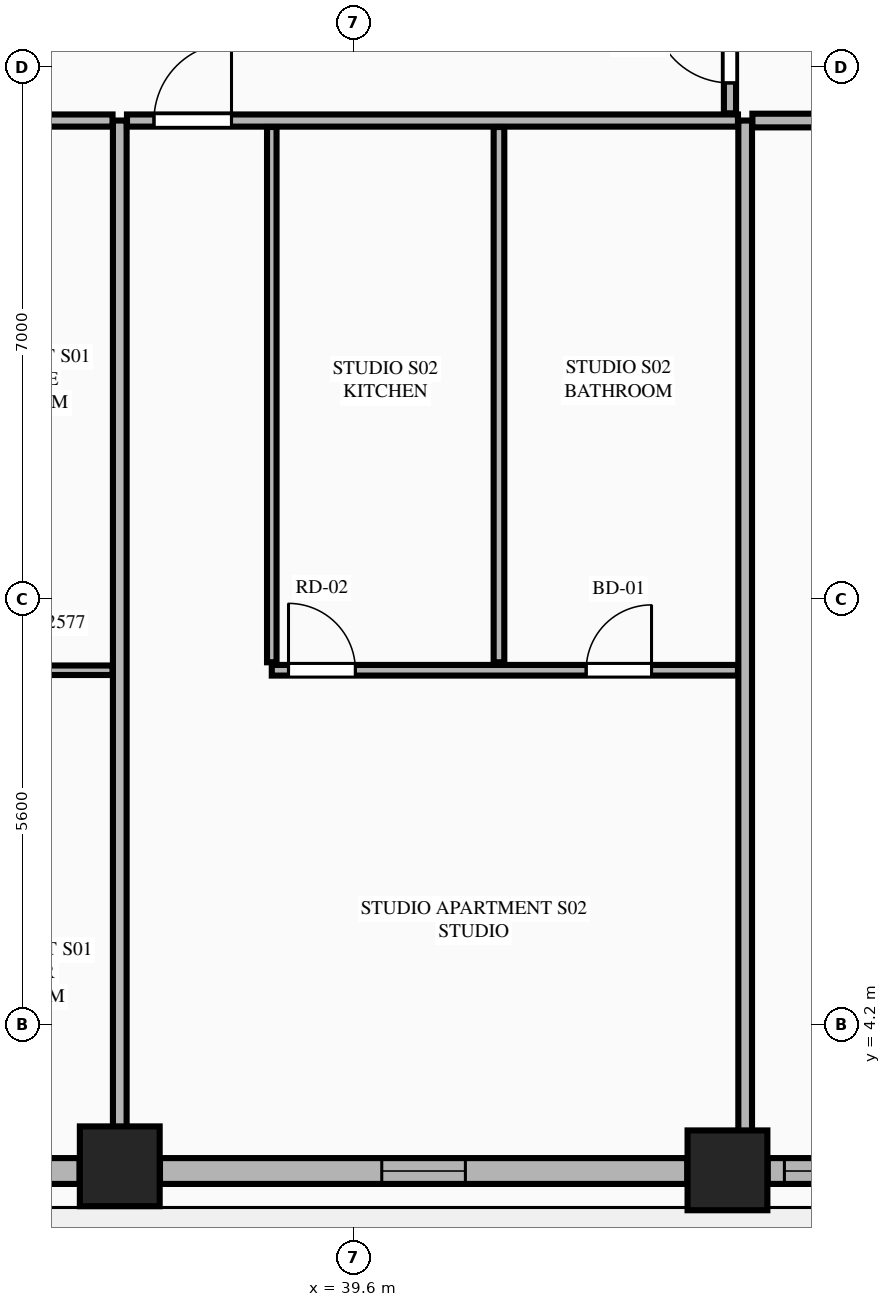
"""IFC4 building model, lengths in metres.
Left out: names, types, materials, properties, quantities, classifications, styles, units other than length and angle.
Written with IfcOpenShell. Run it as: python <this file> out.ifc"""

import sys

from ifc_helpers import new_model, si_unit, direction, frame, frame_2d, origin, origin_2d, place, context, subcontext, project, spatial, rectangle, extrude, element, fill, save


model = new_model("IFC4")
c1 = context("Model", 3, precision=1e-05, world=origin(), true_north=direction((0.0, 1.0)))
c2 = subcontext(c1, "Body", "Model", "MODEL_VIEW")
j1 = project(units=[si_unit("LENGTHUNIT", "METRE"), si_unit("PLANEANGLEUNIT", "RADIAN")], contexts=[c1])
p1 = place(None, origin())
s1 = spatial("IfcSite", under=j1, at=p1, CompositionType="ELEMENT")
p2 = place(p1, origin())
s2 = spatial("IfcBuilding", under=s1, at=p2, CompositionType="ELEMENT")
p3 = place(p2, frame((0.0, 0.0, 90.65)))
s3 = spatial("IfcBuildingStorey", under=s2, at=p3, CompositionType="ELEMENT", Elevation=90.65)
for number, where, z_axis, x_axis in (
    (1, (36.522, 2.342, 0.0), (0.0, 0.0, 1.0), (1.0, 0.0, 0.0)),
    (2, (44.517, 2.289, 0.0), (0.0, 0.0, 1.0), (1.0, 0.0, 0.0)),
):
    element("IfcColumn", number, at=place(p3, frame(where, z_axis=z_axis, x_axis=x_axis)), inside=s3, PredefinedType="COLUMN", context=c2, shape_type="SweptSolid", body=[
        extrude(rectangle(XDim=1.05, YDim=1.05, at=origin_2d()), origin(), (0.0, 0.0, 1.0), 3.55),
    ])
p4 = place(p3, frame((28.807, 2.28, 0.0), z_axis=(0.0, 0.0, 1.0), x_axis=(1.0, 0.0, 0.0)))
e3 = element("IfcWall", 3, at=p4, inside=s3, PredefinedType="STANDARD", context=c2, shape_type="SweptSolid", body=[
    extrude(rectangle(XDim=7.186, YDim=0.34, at=frame_2d((3.593, 0.0))), origin(), (0.0, 0.0, 1.0), 2.712),
])
p5 = place(p4, frame((1.92, 0.0, 0.0)))
e4 = element("IfcOpeningElement", 4, at=p5, cuts=e3, PredefinedType="OPENING", context=c2, shape_type="SweptSolid", body=[
    extrude(rectangle(XDim=1.1, YDim=2.25, at=frame_2d((0.55, 1.125))), frame((0.0, 0.18, 0.0), z_axis=(0.0, -1.0, 0.0), x_axis=(1.0, 0.0, 0.0)), (0.0, 0.0, 1.0), 0.36),
])
p6 = place(p4, frame((5.621, 0.0, 0.75)))
e5 = element("IfcOpeningElement", 5, at=p6, cuts=e3, PredefinedType="OPENING", context=c2, shape_type="SweptSolid", body=[
    extrude(rectangle(XDim=1.1, YDim=1.812, at=frame_2d((0.55, 0.906))), frame((0.0, 0.18, 0.0), z_axis=(0.0, -1.0, 0.0), x_axis=(1.0, 0.0, 0.0)), (0.0, 0.0, 1.0), 0.36),
])
p7 = place(p3, frame((37.051, 2.28, 0.0), z_axis=(0.0, 0.0, 1.0), x_axis=(1.0, 0.0, 0.0)))
e6 = element("IfcWall", 6, at=p7, inside=s3, PredefinedType="STANDARD", context=c2, shape_type="SweptSolid", body=[
    extrude(rectangle(XDim=6.937, YDim=0.34, at=frame_2d((3.469, 0.0))), origin(), (0.0, 0.0, 1.0), 2.712),
])
p8 = place(p7, frame((2.918, 0.0, 0.75)))
e7 = element("IfcOpeningElement", 7, at=p8, cuts=e6, PredefinedType="OPENING", context=c2, shape_type="SweptSolid", body=[
    extrude(rectangle(XDim=1.1, YDim=1.812, at=frame_2d((0.55, 0.906))), frame((0.0, 0.18, 0.0), z_axis=(0.0, -1.0, 0.0), x_axis=(1.0, 0.0, 0.0)), (0.0, 0.0, 1.0), 0.36),
])
p9 = place(p3, frame((45.046, 2.28, 0.0), z_axis=(0.0, 0.0, 1.0), x_axis=(1.0, 0.0, 0.0)))
e8 = element("IfcWall", 8, at=p9, inside=s3, PredefinedType="STANDARD", context=c2, shape_type="SweptSolid", body=[
    extrude(rectangle(XDim=1.32, YDim=0.34, at=frame_2d((0.66, 0.0))), origin(), (0.0, 0.0, 1.0), 3.33),
])
p10 = place(p9, frame((0.22, 0.0, 0.75)))
e9 = element("IfcOpeningElement", 9, at=p10, cuts=e8, PredefinedType="OPENING", context=c2, shape_type="SweptSolid", body=[
    extrude(rectangle(XDim=0.88, YDim=2.0, at=frame_2d((0.44, 1.0))), frame((0.0, 0.18, 0.0), z_axis=(0.0, -1.0, 0.0), x_axis=(1.0, 0.0, 0.0)), (0.0, 0.0, 1.0), 0.36),
])
p11 = place(p3, frame((36.522, 2.455, 0.0), z_axis=(0.0, 0.0, 1.0), x_axis=(0.0, 1.0, 0.0)))
e10 = element("IfcWall", 10, at=p11, inside=s3, PredefinedType="PARTITIONING", context=c2, shape_type="SweptSolid", body=[
    extrude(rectangle(XDim=13.645, YDim=0.18, at=frame_2d((6.823, 0.0))), origin(), (0.0, 0.0, 1.0), 2.637),
])
p12 = place(p3, frame((44.75, 2.455, 0.0), z_axis=(0.0, 0.0, 1.0), x_axis=(0.0, 1.0, 0.0)))
e11 = element("IfcWall", 11, at=p12, inside=s3, PredefinedType="PARTITIONING", context=c2, shape_type="SweptSolid", body=[
    extrude(rectangle(XDim=13.645, YDim=0.18, at=frame_2d((6.823, 0.0))), origin(), (0.0, 0.0, 1.0), 3.33),
])
p13 = place(p3, frame((20.145, 16.1, 0.0), z_axis=(0.0, 0.0, 1.0), x_axis=(1.0, 0.0, 0.0)))
e12 = element("IfcWall", 12, at=p13, inside=s3, PredefinedType="PARTITIONING", context=c2, shape_type="SweptSolid", body=[
    extrude(rectangle(XDim=16.282, YDim=0.16, at=frame_2d((8.141, 0.0))), origin(), (0.0, 0.0, 1.0), 3.33),
])
p14 = place(p13, frame((0.705, 0.0, 0.0)))
e13 = element("IfcOpeningElement", 13, at=p14, cuts=e12, PredefinedType="OPENING", context=c2, shape_type="SweptSolid", body=[
    extrude(rectangle(XDim=1.35, YDim=2.35, at=frame_2d((0.675, 1.175))), frame((0.0, 0.09, 0.0), z_axis=(0.0, -1.0, 0.0), x_axis=(1.0, 0.0, 0.0)), (0.0, 0.0, 1.0), 0.18),
])
p15 = place(p3, frame((33.85, 8.868, 0.0), z_axis=(0.0, 0.0, 1.0), x_axis=(1.0, 0.0, 0.0)))
e14 = element("IfcWall", 14, at=p15, inside=s3, PredefinedType="PARTITIONING", context=c2, shape_type="SweptSolid", body=[
    extrude(rectangle(XDim=2.577, YDim=0.125, at=frame_2d((1.289, 0.0))), origin(), (0.0, 0.0, 1.0), 3.33),
])
p16 = place(p15, frame((0.863, 0.0, 0.0)))
e15 = element("IfcOpeningElement", 15, at=p16, cuts=e14, PredefinedType="OPENING", context=c2, shape_type="SweptSolid", body=[
    extrude(rectangle(XDim=0.86, YDim=2.1, at=frame_2d((0.43, 1.05))), frame((0.0, 0.073, 0.0), z_axis=(0.0, -1.0, 0.0), x_axis=(1.0, 0.0, 0.0)), (0.0, 0.0, 1.0), 0.145),
])
p17 = place(p3, frame((36.617, 16.1, 0.0), z_axis=(0.0, 0.0, 1.0), x_axis=(1.0, 0.0, 0.0)))
e16 = element("IfcWall", 16, at=p17, inside=s3, PredefinedType="PARTITIONING", context=c2, shape_type="SweptSolid", body=[
    extrude(rectangle(XDim=8.038, YDim=0.16, at=frame_2d((4.019, 0.0))), origin(), (0.0, 0.0, 1.0), 3.33),
])
p18 = place(p17, frame((0.355, 0.0, 0.0)))
e17 = element("IfcOpeningElement", 17, at=p18, cuts=e16, PredefinedType="OPENING", context=c2, shape_type="SweptSolid", body=[
    extrude(rectangle(XDim=1.02, YDim=2.25, at=frame_2d((0.51, 1.125))), frame((0.0, 0.09, 0.0), z_axis=(0.0, -1.0, 0.0), x_axis=(1.0, 0.0, 0.0)), (0.0, 0.0, 1.0), 0.18),
])
p19 = place(p3, frame((38.522, 8.973, 0.0), z_axis=(0.0, 0.0, 1.0), x_axis=(0.0, 1.0, 0.0)))
e18 = element("IfcWall", 18, at=p19, inside=s3, PredefinedType="PARTITIONING", context=c2, shape_type="SweptSolid", body=[
    extrude(rectangle(XDim=7.042, YDim=0.125, at=frame_2d((3.521, 0.0))), origin(), (0.0, 0.0, 1.0), 3.33),
])
p20 = place(p3, frame((38.522, 8.868, 0.0), z_axis=(0.0, 0.0, 1.0), x_axis=(1.0, 0.0, 0.0)))
e19 = element("IfcWall", 19, at=p20, inside=s3, PredefinedType="PLUMBINGWALL", context=c2, shape_type="SweptSolid", body=[
    extrude(rectangle(XDim=6.133, YDim=0.14, at=frame_2d((3.066, 0.0))), origin(), (0.0, 0.0, 1.0), 3.33),
])
p21 = place(p20, frame((4.136, 0.0, 0.0)))
e20 = element("IfcOpeningElement", 20, at=p21, cuts=e19, PredefinedType="OPENING", context=c2, shape_type="SweptSolid", body=[
    extrude(rectangle(XDim=0.86, YDim=2.1, at=frame_2d((0.43, 1.05))), frame((0.0, 0.08, 0.0), z_axis=(0.0, -1.0, 0.0), x_axis=(1.0, 0.0, 0.0)), (0.0, 0.0, 1.0), 0.16),
])
p22 = place(p20, frame((0.22, 0.0, 0.0)))
e21 = element("IfcOpeningElement", 21, at=p22, cuts=e19, PredefinedType="OPENING", context=c2, shape_type="SweptSolid", body=[
    extrude(rectangle(XDim=0.88, YDim=2.15, at=frame_2d((0.44, 1.075))), frame((0.0, 0.08, 0.0), z_axis=(0.0, -1.0, 0.0), x_axis=(1.0, 0.0, 0.0)), (0.0, 0.0, 1.0), 0.16),
])
p23 = place(p3, frame((41.511, 8.973, 0.0), z_axis=(0.0, 0.0, 1.0), x_axis=(0.0, 1.0, 0.0)))
e22 = element("IfcWall", 22, at=p23, inside=s3, PredefinedType="PLUMBINGWALL", context=c2, shape_type="SweptSolid", body=[
    extrude(rectangle(XDim=7.042, YDim=0.14, at=frame_2d((3.521, 0.0))), origin(), (0.0, 0.0, 1.0), 3.33),
])
p24 = place(p3, frame((44.845, 16.1, 0.0), z_axis=(0.0, 0.0, 1.0), x_axis=(1.0, 0.0, 0.0)))
e23 = element("IfcWall", 23, at=p24, inside=s3, PredefinedType="PARTITIONING", context=c2, shape_type="SweptSolid", body=[
    extrude(rectangle(XDim=9.467, YDim=0.18, at=frame_2d((4.733, 0.0))), origin(), (0.0, 0.0, 1.0), 3.33),
])
p25 = place(p3, frame((44.55, 16.195, 0.0), z_axis=(0.0, 0.0, 1.0), x_axis=(0.0, 1.0, 0.0)))
e24 = element("IfcWall", 24, at=p25, inside=s3, PredefinedType="PARTITIONING", context=c2, shape_type="SweptSolid", body=[
    extrude(rectangle(XDim=19.41, YDim=0.16, at=frame_2d((9.705, 0.0))), origin(), (0.0, 0.0, 1.0), 2.637),
])
p26 = place(p25, frame((0.4, 0.0, 0.0)))
e25 = element("IfcOpeningElement", 25, at=p26, cuts=e24, PredefinedType="OPENING", context=c2, shape_type="SweptSolid", body=[
    extrude(rectangle(XDim=1.02, YDim=2.25, at=frame_2d((0.51, 1.125))), frame((0.0, 0.09, 0.0), z_axis=(0.0, -1.0, 0.0), x_axis=(1.0, 0.0, 0.0)), (0.0, 0.0, 1.0), 0.18),
])
p27 = place(p8, origin())
e26 = element("IfcWindow", 26, at=p27, inside=s3, PartitioningType="SINGLE_PANEL", PredefinedType="WINDOW", context=c2, shape_type="SweptSolid", body=[
    extrude(rectangle(XDim=1.1, YDim=1.812, at=frame_2d((0.55, 0.906))), frame((0.0, 0.03, 0.0), z_axis=(0.0, -1.0, 0.0), x_axis=(1.0, 0.0, 0.0)), (0.0, 0.0, 1.0), 0.06),
])
fill(e7, e26)
p28 = place(p21, origin())
e27 = element("IfcDoor", 27, at=p28, inside=s3, OperationType="SINGLE_SWING_RIGHT", PredefinedType="DOOR", context=c2, shape_type="SweptSolid", body=[
    extrude(rectangle(XDim=0.86, YDim=2.1, at=frame_2d((0.43, 1.05))), frame((0.0, 0.025, 0.0), z_axis=(0.0, -1.0, 0.0), x_axis=(1.0, 0.0, 0.0)), (0.0, 0.0, 1.0), 0.05),
])
fill(e20, e27)
p29 = place(p18, origin())
e28 = element("IfcDoor", 28, at=p29, inside=s3, OperationType="SINGLE_SWING_RIGHT", PredefinedType="DOOR", context=c2, shape_type="SweptSolid", body=[
    extrude(rectangle(XDim=1.02, YDim=2.25, at=frame_2d((0.51, 1.125))), frame((0.0, 0.025, 0.0), z_axis=(0.0, -1.0, 0.0), x_axis=(1.0, 0.0, 0.0)), (0.0, 0.0, 1.0), 0.05),
])
fill(e17, e28)
p30 = place(p22, origin())
e29 = element("IfcDoor", 29, at=p30, inside=s3, OperationType="SINGLE_SWING_LEFT", PredefinedType="DOOR", context=c2, shape_type="SweptSolid", body=[
    extrude(rectangle(XDim=0.88, YDim=2.15, at=frame_2d((0.44, 1.075))), frame((0.0, 0.025, 0.0), z_axis=(0.0, -1.0, 0.0), x_axis=(1.0, 0.0, 0.0)), (0.0, 0.0, 1.0), 0.05),
])
fill(e21, e29)
p31 = place(p26, origin())
e30 = element("IfcDoor", 30, at=p31, inside=s3, OperationType="SINGLE_SWING_RIGHT", PredefinedType="DOOR", context=c2, shape_type="SweptSolid", body=[
    extrude(rectangle(XDim=1.02, YDim=2.25, at=frame_2d((0.51, 1.125))), frame((0.0, 0.025, 0.0), z_axis=(0.0, -1.0, 0.0), x_axis=(1.0, 0.0, 0.0)), (0.0, 0.0, 1.0), 0.05),
])
fill(e25, e30)
p32 = place(p10, origin())
e31 = element("IfcWindow", 31, at=p32, inside=s3, PartitioningType="SINGLE_PANEL", PredefinedType="WINDOW", context=c2, shape_type="SweptSolid", body=[
    extrude(rectangle(XDim=0.88, YDim=2.0, at=frame_2d((0.44, 1.0))), frame((0.0, 0.03, 0.0), z_axis=(0.0, -1.0, 0.0), x_axis=(1.0, 0.0, 0.0)), (0.0, 0.0, 1.0), 0.06),
])
fill(e9, e31)
save(model, sys.argv[1])
